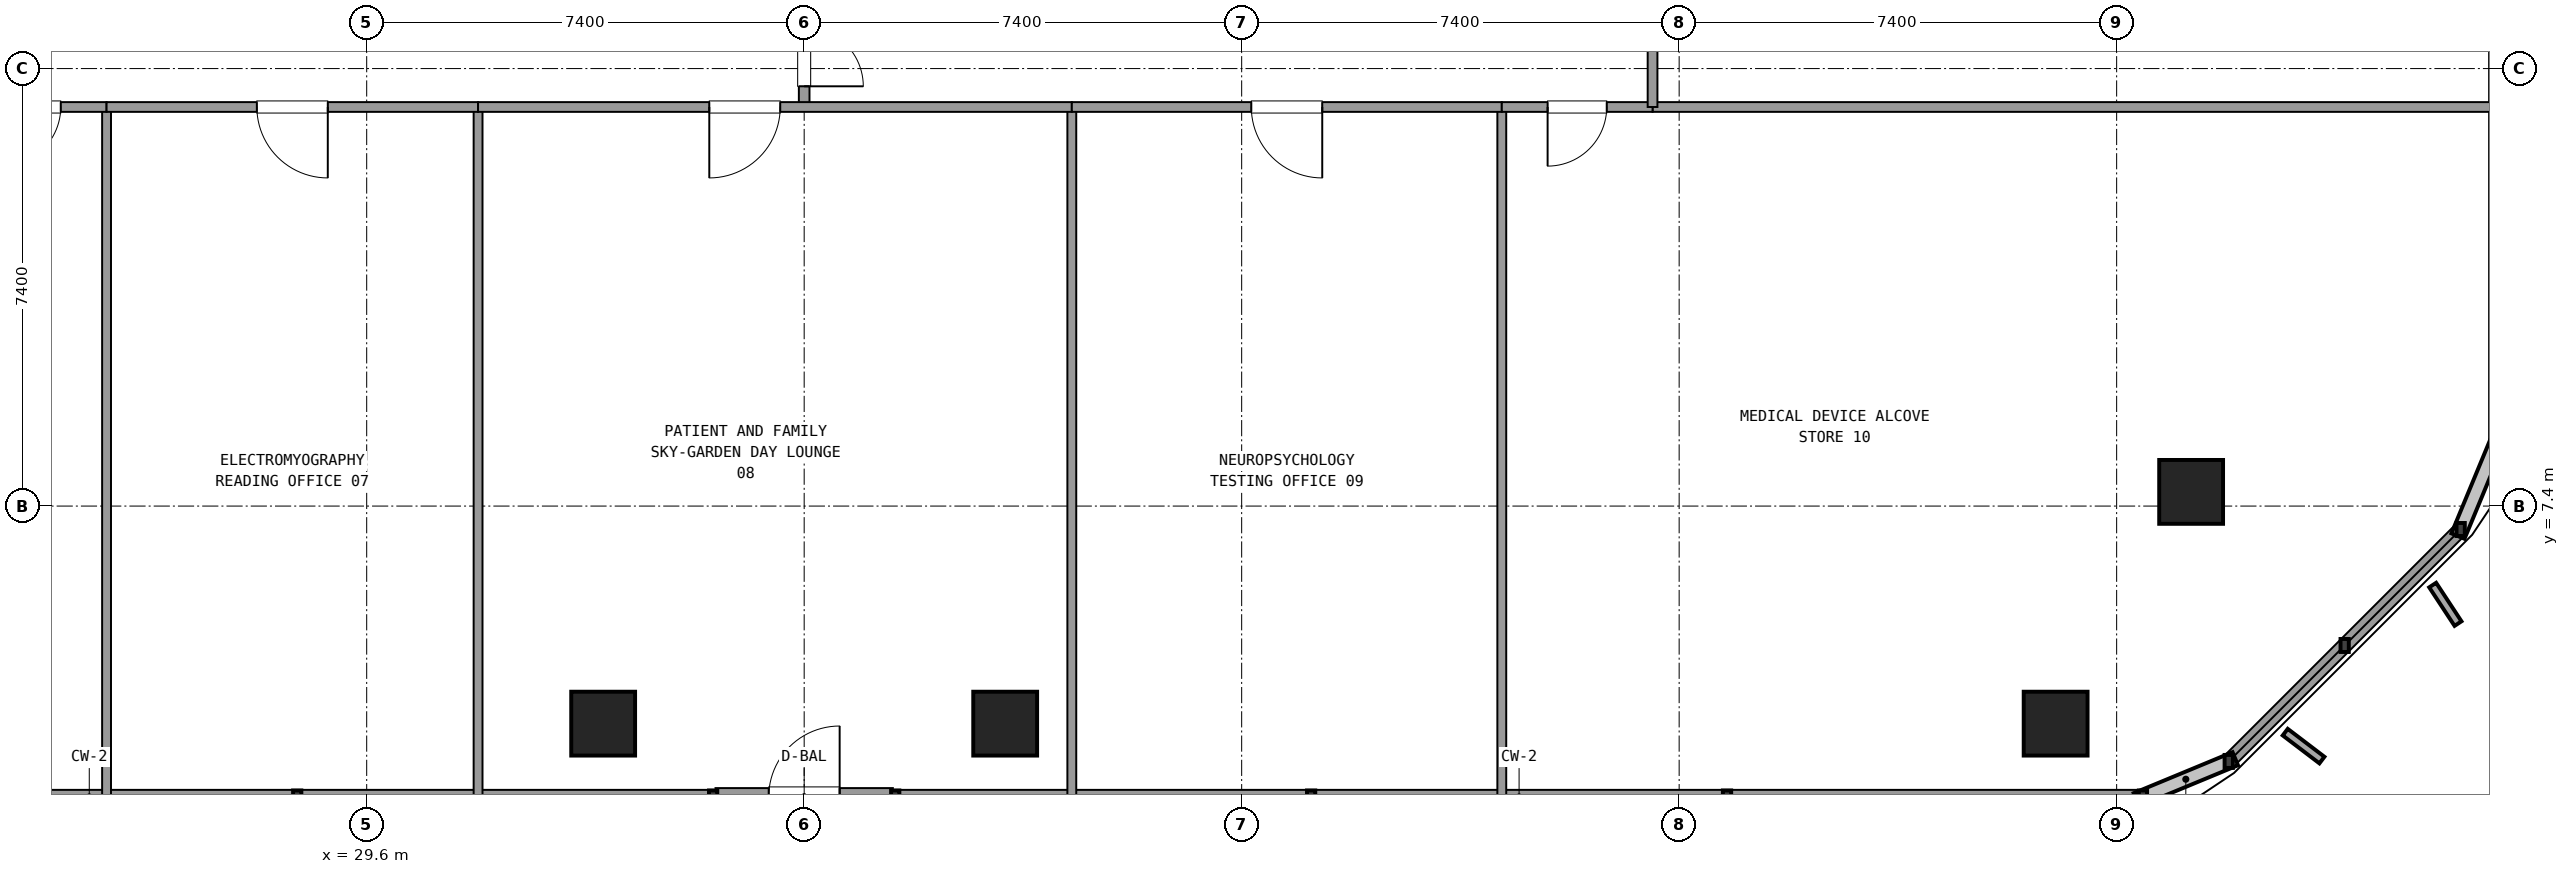
"""IFC4 building model, lengths in metres.
Left out: names, types, materials, properties, quantities, classifications, styles, units other than length and angle.
Written with IfcOpenShell. Run it as: python <this file> out.ifc"""

import sys

from ifc_helpers import new_model, si_unit, direction, frame, frame_2d, origin, origin_2d, place, context, subcontext, project, spatial, rectangle, extrude, element, fill, save


model = new_model("IFC4")
c1 = context("Model", 3, precision=1e-05, world=origin(), true_north=direction((0.0, 1.0)))
c2 = subcontext(c1, "Body", "Model", "MODEL_VIEW")
j1 = project(units=[si_unit("LENGTHUNIT", "METRE"), si_unit("PLANEANGLEUNIT", "RADIAN")], contexts=[c1])
p1 = place(None, origin())
s1 = spatial("IfcSite", under=j1, at=p1, CompositionType="ELEMENT")
p2 = place(p1, origin())
s2 = spatial("IfcBuilding", under=s1, at=p2, CompositionType="ELEMENT")
p3 = place(p2, frame((0.0, 0.0, 67.14)))
s3 = spatial("IfcBuildingStorey", under=s2, at=p3, CompositionType="ELEMENT", Elevation=67.14)
for number, where, z_axis, x_axis in (
    (1, (33.6, 3.72, 0.0), (0.0, 0.0, 1.0), (1.0, 0.0, 0.0)),
    (2, (40.4, 3.72, 0.0), (0.0, 0.0, 1.0), (1.0, 0.0, 0.0)),
    (3, (58.168, 3.72, 0.0), (0.0, 0.0, 1.0), (1.0, 0.0, 0.0)),
    (4, (60.46, 7.64, 0.0), (0.0, 0.0, 1.0), (1.0, 0.0, 0.0)),
):
    element("IfcColumn", number, at=place(p3, frame(where, z_axis=z_axis, x_axis=x_axis)), inside=s3, PredefinedType="COLUMN", context=c2, shape_type="SweptSolid", body=[
        extrude(rectangle(XDim=1.08, YDim=1.08, at=origin_2d()), origin(), (0.0, 0.0, 1.0), 3.6),
    ])
p4 = place(p3, frame((35.5, 2.48, 0.0), z_axis=(0.0, 0.0, 1.0), x_axis=(1.0, 0.0, 0.0)))
e5 = element("IfcWall", 5, at=p4, inside=s3, PredefinedType="SOLIDWALL", context=c2, shape_type="SweptSolid", body=[
    extrude(rectangle(XDim=3.0, YDim=0.3, at=frame_2d((1.5, 0.0))), origin(), (0.0, 0.0, 1.0), 2.63),
])
p5 = place(p4, frame((0.9, 0.0, 0.0)))
e6 = element("IfcOpeningElement", 6, at=p5, cuts=e5, PredefinedType="OPENING", context=c2, shape_type="SweptSolid", body=[
    extrude(rectangle(XDim=1.2, YDim=2.2, at=frame_2d((0.6, 1.1))), frame((0.0, 0.16, 0.0), z_axis=(0.0, -1.0, 0.0), x_axis=(1.0, 0.0, 0.0)), (0.0, 0.0, 1.0), 0.32),
])
for number, where, z_axis, x_axis in (
    (7, (14.355, 2.48, 0.0), (0.0, 0.0, 1.0), (1.0, 0.0, 0.0)),
    (8, (38.54, 2.48, 0.0), (0.0, 0.0, 1.0), (1.0, 0.0, 0.0)),
):
    element("IfcWall", number, at=place(p3, frame(where, z_axis=z_axis, x_axis=x_axis)), inside=s3, PredefinedType="SOLIDWALL", context=c2, shape_type="SweptSolid", body=[
        extrude(rectangle(XDim=21.105, YDim=0.24, at=frame_2d((10.552, 0.0))), origin(), (0.0, 0.0, 1.0), 0.85),
    ])
p6 = place(p3, frame((61.096, 3.081, 0.0), z_axis=(0.0, 0.0, 1.0), x_axis=(0.707128783731, 0.707084777957, 0.0)))
e9 = element("IfcWall", 9, at=p6, inside=s3, PredefinedType="SOLIDWALL", context=c2, shape_type="SweptSolid", body=[
    extrude(rectangle(XDim=5.548, YDim=0.24, at=frame_2d((2.774, 0.0))), origin(), (0.0, 0.0, 1.0), 0.85),
])
p7 = place(p3, frame((37.0, 14.15, 0.0), z_axis=(0.0, 0.0, 1.0), x_axis=(0.0, 1.0, 0.0)))
e10 = element("IfcWall", 10, at=p7, inside=s3, PredefinedType="PARTITIONING", context=c2, shape_type="SweptSolid", body=[
    extrude(rectangle(XDim=2.7, YDim=0.18, at=frame_2d((1.35, 0.0))), origin(), (0.0, 0.0, 1.0), 2.59),
])
p8 = place(p7, frame((0.35, 0.0, 0.0)))
e11 = element("IfcOpeningElement", 11, at=p8, cuts=e10, PredefinedType="OPENING", context=c2, shape_type="SweptSolid", body=[
    extrude(rectangle(XDim=2.0, YDim=2.2, at=frame_2d((1.0, 1.1))), frame((0.0, 0.1, 0.0), z_axis=(0.0, -1.0, 0.0), x_axis=(1.0, 0.0, 0.0)), (0.0, 0.0, 1.0), 0.2),
])
p9 = place(p3, frame((51.35, 14.15, 0.0), z_axis=(0.0, 0.0, 1.0), x_axis=(1.0, 0.0, 0.0)))
e12 = element("IfcWall", 12, at=p9, inside=s3, PredefinedType="PARTITIONING", context=c2, shape_type="SweptSolid", body=[
    extrude(rectangle(XDim=14.25, YDim=0.165, at=frame_2d((7.125, 0.0))), origin(), (0.0, 0.0, 1.0), 2.59),
])
p10 = place(p3, frame((25.2, 14.15, 0.0), z_axis=(0.0, 0.0, 1.0), x_axis=(0.0, -1.0, 0.0)))
e13 = element("IfcWall", 13, at=p10, inside=s3, PredefinedType="PARTITIONING", context=c2, shape_type="SweptSolid", body=[
    extrude(rectangle(XDim=11.65, YDim=0.15, at=frame_2d((5.825, 0.0))), origin(), (0.0, 0.0, 1.0), 2.59),
])
p11 = place(p3, frame((22.65, 14.15, 0.0), z_axis=(0.0, 0.0, 1.0), x_axis=(1.0, 0.0, 0.0)))
e14 = element("IfcWall", 14, at=p11, inside=s3, PredefinedType="PARTITIONING", context=c2, shape_type="SweptSolid", body=[
    extrude(rectangle(XDim=2.55, YDim=0.165, at=frame_2d((1.275, 0.0))), origin(), (0.0, 0.0, 1.0), 2.59),
])
p12 = place(p11, frame((0.775, 0.0, 0.0)))
e15 = element("IfcOpeningElement", 15, at=p12, cuts=e14, PredefinedType="OPENING", context=c2, shape_type="SweptSolid", body=[
    extrude(rectangle(XDim=1.0, YDim=2.15, at=frame_2d((0.5, 1.075))), frame((0.0, 0.093, 0.0), z_axis=(0.0, -1.0, 0.0), x_axis=(1.0, 0.0, 0.0)), (0.0, 0.0, 1.0), 0.185),
])
p13 = place(p3, frame((31.484, 14.15, 0.0), z_axis=(0.0, 0.0, 1.0), x_axis=(0.0, -1.0, 0.0)))
e16 = element("IfcWall", 16, at=p13, inside=s3, PredefinedType="PARTITIONING", context=c2, shape_type="SweptSolid", body=[
    extrude(rectangle(XDim=11.65, YDim=0.15, at=frame_2d((5.825, 0.0))), origin(), (0.0, 0.0, 1.0), 2.59),
])
p14 = place(p3, frame((25.2, 14.15, 0.0), z_axis=(0.0, 0.0, 1.0), x_axis=(1.0, 0.0, 0.0)))
e17 = element("IfcWall", 17, at=p14, inside=s3, PredefinedType="PARTITIONING", context=c2, shape_type="SweptSolid", body=[
    extrude(rectangle(XDim=6.284, YDim=0.165, at=frame_2d((3.142, 0.0))), origin(), (0.0, 0.0, 1.0), 2.59),
])
p15 = place(p14, frame((2.542, 0.0, 0.0)))
e18 = element("IfcOpeningElement", 18, at=p15, cuts=e17, PredefinedType="OPENING", context=c2, shape_type="SweptSolid", body=[
    extrude(rectangle(XDim=1.2, YDim=2.15, at=frame_2d((0.6, 1.075))), frame((0.0, 0.093, 0.0), z_axis=(0.0, -1.0, 0.0), x_axis=(1.0, 0.0, 0.0)), (0.0, 0.0, 1.0), 0.185),
])
p16 = place(p3, frame((41.527, 14.15, 0.0), z_axis=(0.0, 0.0, 1.0), x_axis=(0.0, -1.0, 0.0)))
e19 = element("IfcWall", 19, at=p16, inside=s3, PredefinedType="PARTITIONING", context=c2, shape_type="SweptSolid", body=[
    extrude(rectangle(XDim=11.65, YDim=0.15, at=frame_2d((5.825, 0.0))), origin(), (0.0, 0.0, 1.0), 2.59),
])
p17 = place(p3, frame((31.484, 14.15, 0.0), z_axis=(0.0, 0.0, 1.0), x_axis=(1.0, 0.0, 0.0)))
e20 = element("IfcWall", 20, at=p17, inside=s3, PredefinedType="PARTITIONING", context=c2, shape_type="SweptSolid", body=[
    extrude(rectangle(XDim=10.043, YDim=0.165, at=frame_2d((5.021, 0.0))), origin(), (0.0, 0.0, 1.0), 2.59),
])
p18 = place(p17, frame((3.911, 0.0, 0.0)))
e21 = element("IfcOpeningElement", 21, at=p18, cuts=e20, PredefinedType="OPENING", context=c2, shape_type="SweptSolid", body=[
    extrude(rectangle(XDim=1.2, YDim=2.15, at=frame_2d((0.6, 1.075))), frame((0.0, 0.093, 0.0), z_axis=(0.0, -1.0, 0.0), x_axis=(1.0, 0.0, 0.0)), (0.0, 0.0, 1.0), 0.185),
])
p19 = place(p3, frame((48.8, 14.15, 0.0), z_axis=(0.0, 0.0, 1.0), x_axis=(0.0, -1.0, 0.0)))
e22 = element("IfcWall", 22, at=p19, inside=s3, PredefinedType="PARTITIONING", context=c2, shape_type="SweptSolid", body=[
    extrude(rectangle(XDim=11.65, YDim=0.15, at=frame_2d((5.825, 0.0))), origin(), (0.0, 0.0, 1.0), 2.59),
])
p20 = place(p3, frame((41.527, 14.15, 0.0), z_axis=(0.0, 0.0, 1.0), x_axis=(1.0, 0.0, 0.0)))
e23 = element("IfcWall", 23, at=p20, inside=s3, PredefinedType="PARTITIONING", context=c2, shape_type="SweptSolid", body=[
    extrude(rectangle(XDim=7.273, YDim=0.165, at=frame_2d((3.636, 0.0))), origin(), (0.0, 0.0, 1.0), 2.59),
])
p21 = place(p20, frame((3.036, 0.0, 0.0)))
e24 = element("IfcOpeningElement", 24, at=p21, cuts=e23, PredefinedType="OPENING", context=c2, shape_type="SweptSolid", body=[
    extrude(rectangle(XDim=1.2, YDim=2.15, at=frame_2d((0.6, 1.075))), frame((0.0, 0.093, 0.0), z_axis=(0.0, -1.0, 0.0), x_axis=(1.0, 0.0, 0.0)), (0.0, 0.0, 1.0), 0.185),
])
p22 = place(p3, frame((48.8, 14.15, 0.0), z_axis=(0.0, 0.0, 1.0), x_axis=(1.0, 0.0, 0.0)))
e25 = element("IfcWall", 25, at=p22, inside=s3, PredefinedType="PARTITIONING", context=c2, shape_type="SweptSolid", body=[
    extrude(rectangle(XDim=2.55, YDim=0.165, at=frame_2d((1.275, 0.0))), origin(), (0.0, 0.0, 1.0), 2.59),
])
p23 = place(p22, frame((0.775, 0.0, 0.0)))
e26 = element("IfcOpeningElement", 26, at=p23, cuts=e25, PredefinedType="OPENING", context=c2, shape_type="SweptSolid", body=[
    extrude(rectangle(XDim=1.0, YDim=2.15, at=frame_2d((0.5, 1.075))), frame((0.0, 0.093, 0.0), z_axis=(0.0, -1.0, 0.0), x_axis=(1.0, 0.0, 0.0)), (0.0, 0.0, 1.0), 0.185),
])
p24 = place(p3, frame((51.35, 14.15, 0.0), z_axis=(0.0, 0.0, 1.0), x_axis=(0.0, 1.0, 0.0)))
e27 = element("IfcWall", 27, at=p24, inside=s3, PredefinedType="PARTITIONING", context=c2, shape_type="SweptSolid", body=[
    extrude(rectangle(XDim=6.815, YDim=0.165, at=frame_2d((3.408, 0.0))), origin(), (0.0, 0.0, 1.0), 2.59),
])
p25 = place(p24, frame((2.807, 0.0, 0.0)))
e28 = element("IfcOpeningElement", 28, at=p25, cuts=e27, PredefinedType="OPENING", context=c2, shape_type="SweptSolid", body=[
    extrude(rectangle(XDim=1.2, YDim=2.15, at=frame_2d((0.6, 1.075))), frame((0.0, 0.093, 0.0), z_axis=(0.0, -1.0, 0.0), x_axis=(1.0, 0.0, 0.0)), (0.0, 0.0, 1.0), 0.185),
])
p26 = place(p8, frame((2.0, 0.0, 0.0), z_axis=(0.0, 0.0, 1.0), x_axis=(-1.0, 0.0, 0.0)))
e29 = element("IfcDoor", 29, at=p26, inside=s3, OperationType="DOUBLE_DOOR_SINGLE_SWING", PredefinedType="DOOR", context=c2, shape_type="SweptSolid", body=[
    extrude(rectangle(XDim=2.0, YDim=2.2, at=frame_2d((1.0, 1.1))), frame((0.0, 0.025, 0.0), z_axis=(0.0, -1.0, 0.0), x_axis=(1.0, 0.0, 0.0)), (0.0, 0.0, 1.0), 0.05),
])
fill(e11, e29)
p27 = place(p12, frame((1.0, 0.0, 0.0), z_axis=(0.0, 0.0, 1.0), x_axis=(-1.0, 0.0, 0.0)))
e30 = element("IfcDoor", 30, at=p27, inside=s3, OperationType="SINGLE_SWING_LEFT", PredefinedType="DOOR", context=c2, shape_type="SweptSolid", body=[
    extrude(rectangle(XDim=1.0, YDim=2.15, at=frame_2d((0.5, 1.075))), frame((0.0, 0.025, 0.0), z_axis=(0.0, -1.0, 0.0), x_axis=(1.0, 0.0, 0.0)), (0.0, 0.0, 1.0), 0.05),
])
fill(e15, e30)
p28 = place(p15, frame((1.2, 0.0, 0.0), z_axis=(0.0, 0.0, 1.0), x_axis=(-1.0, 0.0, 0.0)))
e31 = element("IfcDoor", 31, at=p28, inside=s3, OperationType="SINGLE_SWING_RIGHT", PredefinedType="DOOR", context=c2, shape_type="SweptSolid", body=[
    extrude(rectangle(XDim=1.2, YDim=2.15, at=frame_2d((0.6, 1.075))), frame((0.0, 0.025, 0.0), z_axis=(0.0, -1.0, 0.0), x_axis=(1.0, 0.0, 0.0)), (0.0, 0.0, 1.0), 0.05),
])
fill(e18, e31)
p29 = place(p18, frame((1.2, 0.0, 0.0), z_axis=(0.0, 0.0, 1.0), x_axis=(-1.0, 0.0, 0.0)))
e32 = element("IfcDoor", 32, at=p29, inside=s3, OperationType="SINGLE_SWING_LEFT", PredefinedType="DOOR", context=c2, shape_type="SweptSolid", body=[
    extrude(rectangle(XDim=1.2, YDim=2.15, at=frame_2d((0.6, 1.075))), frame((0.0, 0.025, 0.0), z_axis=(0.0, -1.0, 0.0), x_axis=(1.0, 0.0, 0.0)), (0.0, 0.0, 1.0), 0.05),
])
fill(e21, e32)
p30 = place(p21, frame((1.2, 0.0, 0.0), z_axis=(0.0, 0.0, 1.0), x_axis=(-1.0, 0.0, 0.0)))
e33 = element("IfcDoor", 33, at=p30, inside=s3, OperationType="SINGLE_SWING_RIGHT", PredefinedType="DOOR", context=c2, shape_type="SweptSolid", body=[
    extrude(rectangle(XDim=1.2, YDim=2.15, at=frame_2d((0.6, 1.075))), frame((0.0, 0.025, 0.0), z_axis=(0.0, -1.0, 0.0), x_axis=(1.0, 0.0, 0.0)), (0.0, 0.0, 1.0), 0.05),
])
fill(e24, e33)
p31 = place(p23, frame((1.0, 0.0, 0.0), z_axis=(0.0, 0.0, 1.0), x_axis=(-1.0, 0.0, 0.0)))
e34 = element("IfcDoor", 34, at=p31, inside=s3, OperationType="SINGLE_SWING_LEFT", PredefinedType="DOOR", context=c2, shape_type="SweptSolid", body=[
    extrude(rectangle(XDim=1.0, YDim=2.15, at=frame_2d((0.5, 1.075))), frame((0.0, 0.025, 0.0), z_axis=(0.0, -1.0, 0.0), x_axis=(1.0, 0.0, 0.0)), (0.0, 0.0, 1.0), 0.05),
])
fill(e26, e34)
save(model, sys.argv[1])
